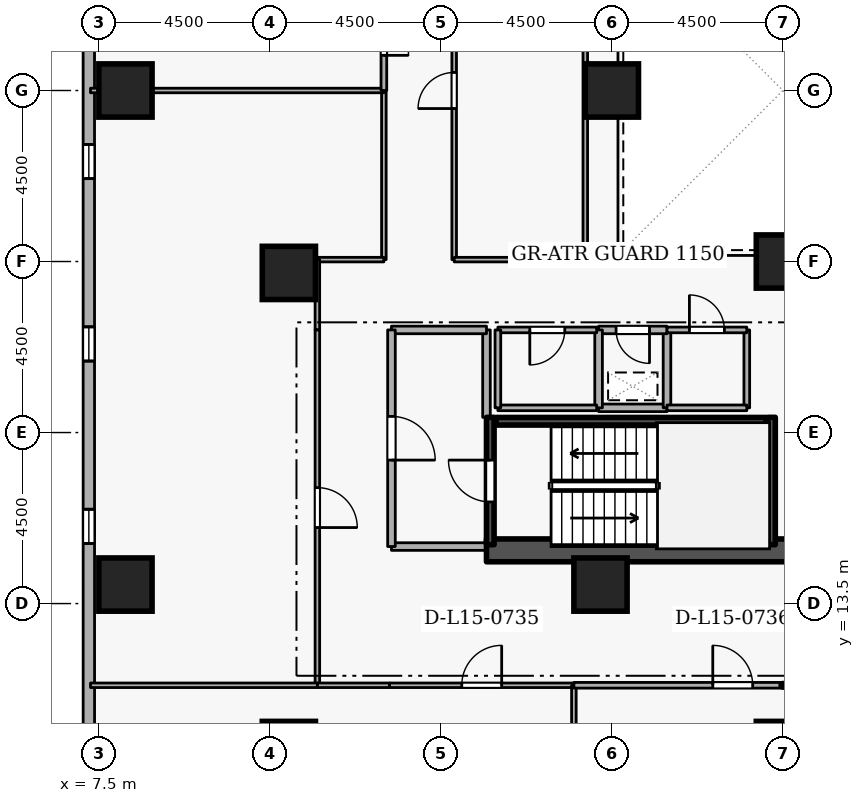
"""IFC4 building model, lengths in metres.
Left out: names, types, materials, properties, quantities, classifications, styles, units other than length and angle.
Written with IfcOpenShell. Run it as: python <this file> out.ifc"""

import sys

from ifc_helpers import new_model, si_unit, direction, frame, frame_2d, origin, origin_2d, place, context, subcontext, project, spatial, rectangle, extrude, element, fill, save


model = new_model("IFC4")
c1 = context("Model", 3, precision=1e-05, world=origin(), true_north=direction((0.0, 1.0)))
c2 = subcontext(c1, "Body", "Model", "MODEL_VIEW")
j1 = project(units=[si_unit("LENGTHUNIT", "METRE"), si_unit("PLANEANGLEUNIT", "RADIAN")], contexts=[c1])
p1 = place(None, origin())
s1 = spatial("IfcSite", under=j1, at=p1, CompositionType="ELEMENT")
p2 = place(p1, origin())
s2 = spatial("IfcBuilding", under=s1, at=p2, CompositionType="ELEMENT")
p3 = place(p2, frame((0.0, 0.0, 60.9)))
s3 = spatial("IfcBuildingStorey", under=s2, at=p3, CompositionType="ELEMENT", Elevation=60.9)
p4 = place(p3, frame((17.7, 14.9, 0.0), z_axis=(0.0, 0.0, 1.0), x_axis=(1.0, 0.0, 0.0)))
e1 = element("IfcWall", 1, at=p4, inside=s3, PredefinedType="SHEAR", context=c2, shape_type="SweptSolid", body=[
    extrude(rectangle(XDim=15.6, YDim=0.6, at=frame_2d((7.8, 0.0))), origin(), (0.0, 0.0, 1.0), 3.6),
])
for number, where, z_axis, x_axis in (
    (2, (12.5, 9.7, 0.0), (0.0, 0.0, 1.0), (1.0, 0.0, 0.0)),
    (3, (25.5, 9.7, 0.0), (0.0, 0.0, 1.0), (1.0, 0.0, 0.0)),
    (4, (8.2, 14.0, 0.0), (0.0, 0.0, 1.0), (1.0, 0.0, 0.0)),
    (5, (8.2, 27.0, 0.0), (0.0, 0.0, 1.0), (1.0, 0.0, 0.0)),
    (6, (12.5, 22.2, 0.0), (0.0, 0.0, 1.0), (1.0, 0.0, 0.0)),
    (7, (20.7, 14.0, 0.0), (0.0, 0.0, 1.0), (1.0, 0.0, 0.0)),
    (8, (25.5, 22.5, 0.0), (0.0, 0.0, 1.0), (1.0, 0.0, 0.0)),
    (9, (21.0, 27.0, 0.0), (0.0, 0.0, 1.0), (1.0, 0.0, 0.0)),
):
    element("IfcColumn", number, at=place(p3, frame(where, z_axis=z_axis, x_axis=x_axis)), inside=s3, PredefinedType="COLUMN", context=c2, shape_type="SweptSolid", body=[
        extrude(rectangle(XDim=1.4, YDim=1.4, at=origin_2d()), origin(), (0.0, 0.0, 1.0), 3.6),
    ])
p5 = place(p3, frame((7.235, 42.681, 0.0), z_axis=(0.0, 0.0, 1.0), x_axis=(5.985515e-05, -0.999999998209, 0.0)))
e10 = element("IfcWall", 10, at=p5, inside=s3, PredefinedType="STANDARD", context=c2, shape_type="SweptSolid", body=[
    extrude(rectangle(XDim=36.71, YDim=0.3, at=frame_2d((18.355, 0.0))), origin(), (0.0, 0.0, 1.0), 2.7),
])
p6 = place(p5, frame((7.5, 0.0, 0.72)))
e11 = element("IfcOpeningElement", 11, at=p6, cuts=e10, PredefinedType="OPENING", context=c2, shape_type="SweptSolid", body=[
    extrude(rectangle(XDim=0.9, YDim=1.75, at=frame_2d((0.45, 0.875))), frame((0.0, 0.16, 0.0), z_axis=(0.0, -1.0, 0.0), x_axis=(1.0, 0.0, 0.0)), (0.0, 0.0, 1.0), 0.32),
])
p7 = place(p5, frame((17.1, 0.0, 0.72)))
e12 = element("IfcOpeningElement", 12, at=p7, cuts=e10, PredefinedType="OPENING", context=c2, shape_type="SweptSolid", body=[
    extrude(rectangle(XDim=0.9, YDim=1.75, at=frame_2d((0.45, 0.875))), frame((0.0, 0.16, 0.0), z_axis=(0.0, -1.0, 0.0), x_axis=(1.0, 0.0, 0.0)), (0.0, 0.0, 1.0), 0.32),
])
p8 = place(p5, frame((21.9, 0.0, 0.72)))
e13 = element("IfcOpeningElement", 13, at=p8, cuts=e10, PredefinedType="OPENING", context=c2, shape_type="SweptSolid", body=[
    extrude(rectangle(XDim=0.9, YDim=1.75, at=frame_2d((0.45, 0.875))), frame((0.0, 0.16, 0.0), z_axis=(0.0, -1.0, 0.0), x_axis=(1.0, 0.0, 0.0)), (0.0, 0.0, 1.0), 0.32),
])
p9 = place(p5, frame((26.7, 0.0, 0.72)))
e14 = element("IfcOpeningElement", 14, at=p9, cuts=e10, PredefinedType="OPENING", context=c2, shape_type="SweptSolid", body=[
    extrude(rectangle(XDim=0.9, YDim=1.75, at=frame_2d((0.45, 0.875))), frame((0.0, 0.16, 0.0), z_axis=(0.0, -1.0, 0.0), x_axis=(1.0, 0.0, 0.0)), (0.0, 0.0, 1.0), 0.32),
])
p10 = place(p3, frame((17.8, 15.05, 0.0), z_axis=(0.0, 0.0, 1.0), x_axis=(0.0, 1.0, 0.0)))
e15 = element("IfcWall", 15, at=p10, inside=s3, PredefinedType="SHEAR", context=c2, shape_type="SweptSolid", body=[
    extrude(rectangle(XDim=3.35, YDim=0.2, at=frame_2d((1.675, 0.0))), origin(), (0.0, 0.0, 1.0), 3.6),
])
p11 = place(p10, frame((1.125, 0.0, 0.0)))
e16 = element("IfcOpeningElement", 16, at=p11, cuts=e15, PredefinedType="OPENING", context=c2, shape_type="SweptSolid", body=[
    extrude(rectangle(XDim=1.1, YDim=2.1, at=frame_2d((0.55, 1.05))), frame((0.0, 0.11, 0.0), z_axis=(0.0, -1.0, 0.0), x_axis=(1.0, 0.0, 0.0)), (0.0, 0.0, 1.0), 0.22),
])
p12 = place(p3, frame((25.2, 18.4, 0.0), z_axis=(0.0, 0.0, 1.0), x_axis=(0.0, -1.0, 0.0)))
e17 = element("IfcWall", 17, at=p12, inside=s3, PredefinedType="SHEAR", context=c2, shape_type="SweptSolid", body=[
    extrude(rectangle(XDim=3.35, YDim=0.2, at=frame_2d((1.675, 0.0))), origin(), (0.0, 0.0, 1.0), 3.6),
])
p13 = place(p3, frame((25.05, 18.297, 0.0), z_axis=(0.0, 0.0, 1.0), x_axis=(-1.0, 0.0, 0.0)))
e18 = element("IfcWall", 18, at=p13, inside=s3, PredefinedType="SHEAR", context=c2, shape_type="SweptSolid", body=[
    extrude(rectangle(XDim=7.1, YDim=0.2, at=frame_2d((3.55, 0.0))), origin(), (0.0, 0.0, 1.0), 3.6),
])
p14 = place(p3, frame((15.2, 15.0, 0.0), z_axis=(0.0, 0.0, 1.0), x_axis=(1.0, 0.0, 0.0)))
e19 = element("IfcWall", 19, at=p14, inside=s3, PredefinedType="STANDARD", context=c2, shape_type="SweptSolid", body=[
    extrude(rectangle(XDim=2.5, YDim=0.2, at=frame_2d((1.25, 0.0))), origin(), (0.0, 0.0, 1.0), 3.34),
])
p15 = place(p3, frame((17.7, 18.4, 0.0), z_axis=(0.0, 0.0, 1.0), x_axis=(0.0, 1.0, 0.0)))
e20 = element("IfcWall", 20, at=p15, inside=s3, PredefinedType="STANDARD", context=c2, shape_type="SweptSolid", body=[
    extrude(rectangle(XDim=2.3, YDim=0.2, at=frame_2d((1.15, 0.0))), origin(), (0.0, 0.0, 1.0), 2.545),
])
p16 = place(p3, frame((17.7, 20.7, 0.0), z_axis=(0.0, 0.0, 1.0), x_axis=(-1.0, 0.0, 0.0)))
e21 = element("IfcWall", 21, at=p16, inside=s3, PredefinedType="STANDARD", context=c2, shape_type="SweptSolid", body=[
    extrude(rectangle(XDim=2.5, YDim=0.2, at=frame_2d((1.25, 0.0))), origin(), (0.0, 0.0, 1.0), 3.34),
])
p17 = place(p3, frame((15.2, 20.7, 0.0), z_axis=(0.0, 0.0, 1.0), x_axis=(0.0, -1.0, 0.0)))
e22 = element("IfcWall", 22, at=p17, inside=s3, PredefinedType="STANDARD", context=c2, shape_type="SweptSolid", body=[
    extrude(rectangle(XDim=5.7, YDim=0.2, at=frame_2d((2.85, 0.0))), origin(), (0.0, 0.0, 1.0), 3.34),
])
p18 = place(p17, frame((2.275, 0.0, 0.0)))
e23 = element("IfcOpeningElement", 23, at=p18, cuts=e22, PredefinedType="OPENING", context=c2, shape_type="SweptSolid", body=[
    extrude(rectangle(XDim=1.15, YDim=2.1, at=frame_2d((0.575, 1.05))), frame((0.0, 0.11, 0.0), z_axis=(0.0, -1.0, 0.0), x_axis=(1.0, 0.0, 0.0)), (0.0, 0.0, 1.0), 0.22),
])
p19 = place(p3, frame((20.65, 18.65, 0.0), z_axis=(0.0, 0.0, 1.0), x_axis=(1.0, 0.0, 0.0)))
e24 = element("IfcWall", 24, at=p19, inside=s3, PredefinedType="STANDARD", context=c2, shape_type="SweptSolid", body=[
    extrude(rectangle(XDim=1.8, YDim=0.2, at=frame_2d((0.9, 0.0))), origin(), (0.0, 0.0, 1.0), 3.34),
])
p20 = place(p3, frame((22.45, 18.65, 0.0), z_axis=(0.0, 0.0, 1.0), x_axis=(0.0, 1.0, 0.0)))
e25 = element("IfcWall", 25, at=p20, inside=s3, PredefinedType="STANDARD", context=c2, shape_type="SweptSolid", body=[
    extrude(rectangle(XDim=2.05, YDim=0.2, at=frame_2d((1.025, 0.0))), origin(), (0.0, 0.0, 1.0), 3.34),
])
p21 = place(p3, frame((22.45, 20.7, 0.0), z_axis=(0.0, 0.0, 1.0), x_axis=(-1.0, 0.0, 0.0)))
e26 = element("IfcWall", 26, at=p21, inside=s3, PredefinedType="STANDARD", context=c2, shape_type="SweptSolid", body=[
    extrude(rectangle(XDim=1.8, YDim=0.2, at=frame_2d((0.9, 0.0))), origin(), (0.0, 0.0, 1.0), 3.34),
])
p22 = place(p21, frame((0.46, 0.0, 0.0)))
e27 = element("IfcOpeningElement", 27, at=p22, cuts=e26, PredefinedType="OPENING", context=c2, shape_type="SweptSolid", body=[
    extrude(rectangle(XDim=0.88, YDim=2.04, at=frame_2d((0.44, 1.02))), frame((0.0, 0.11, 0.0), z_axis=(0.0, -1.0, 0.0), x_axis=(1.0, 0.0, 0.0)), (0.0, 0.0, 1.0), 0.22),
])
p23 = place(p3, frame((20.65, 20.7, 0.0), z_axis=(0.0, 0.0, 1.0), x_axis=(0.0, -1.0, 0.0)))
e28 = element("IfcWall", 28, at=p23, inside=s3, PredefinedType="STANDARD", context=c2, shape_type="SweptSolid", body=[
    extrude(rectangle(XDim=2.05, YDim=0.2, at=frame_2d((1.025, 0.0))), origin(), (0.0, 0.0, 1.0), 3.34),
])
p24 = place(p3, frame((18.0, 18.65, 0.0), z_axis=(0.0, 0.0, 1.0), x_axis=(1.0, 0.0, 0.0)))
e29 = element("IfcWall", 29, at=p24, inside=s3, PredefinedType="PARTITIONING", context=c2, shape_type="SweptSolid", body=[
    extrude(rectangle(XDim=2.6, YDim=0.15, at=frame_2d((1.3, 0.0))), origin(), (0.0, 0.0, 1.0), 3.34),
])
p25 = place(p3, frame((20.6, 20.7, 0.0), z_axis=(0.0, 0.0, 1.0), x_axis=(-1.0, 0.0, 0.0)))
e30 = element("IfcWall", 30, at=p25, inside=s3, PredefinedType="PARTITIONING", context=c2, shape_type="SweptSolid", body=[
    extrude(rectangle(XDim=2.6, YDim=0.15, at=frame_2d((1.3, 0.0))), origin(), (0.0, 0.0, 1.0), 3.34),
])
p26 = place(p25, frame((0.84, 0.0, 0.0)))
e31 = element("IfcOpeningElement", 31, at=p26, cuts=e30, PredefinedType="OPENING", context=c2, shape_type="SweptSolid", body=[
    extrude(rectangle(XDim=0.92, YDim=2.08, at=frame_2d((0.46, 1.04))), frame((0.0, 0.085, 0.0), z_axis=(0.0, -1.0, 0.0), x_axis=(1.0, 0.0, 0.0)), (0.0, 0.0, 1.0), 0.17),
])
p27 = place(p3, frame((18.0, 20.7, 0.0), z_axis=(0.0, 0.0, 1.0), x_axis=(0.0, -1.0, 0.0)))
e32 = element("IfcWall", 32, at=p27, inside=s3, PredefinedType="PARTITIONING", context=c2, shape_type="SweptSolid", body=[
    extrude(rectangle(XDim=2.05, YDim=0.15, at=frame_2d((1.025, 0.0))), origin(), (0.0, 0.0, 1.0), 2.545),
])
p28 = place(p3, frame((24.55, 20.7, 0.0), z_axis=(0.0, 0.0, 1.0), x_axis=(0.0, -1.0, 0.0)))
e33 = element("IfcWall", 33, at=p28, inside=s3, PredefinedType="PARTITIONING", context=c2, shape_type="SweptSolid", body=[
    extrude(rectangle(XDim=2.05, YDim=0.15, at=frame_2d((1.025, 0.0))), origin(), (0.0, 0.0, 1.0), 3.34),
])
p29 = place(p3, frame((24.55, 18.65, 0.0), z_axis=(0.0, 0.0, 1.0), x_axis=(-1.0, 0.0, 0.0)))
e34 = element("IfcWall", 34, at=p29, inside=s3, PredefinedType="PARTITIONING", context=c2, shape_type="SweptSolid", body=[
    extrude(rectangle(XDim=2.1, YDim=0.15, at=frame_2d((1.05, 0.0))), origin(), (0.0, 0.0, 1.0), 3.34),
])
p30 = place(p3, frame((22.45, 20.7, 0.0), z_axis=(0.0, 0.0, 1.0), x_axis=(1.0, 0.0, 0.0)))
e35 = element("IfcWall", 35, at=p30, inside=s3, PredefinedType="PARTITIONING", context=c2, shape_type="SweptSolid", body=[
    extrude(rectangle(XDim=2.1, YDim=0.15, at=frame_2d((1.05, 0.0))), origin(), (0.0, 0.0, 1.0), 3.34),
])
p31 = place(p30, frame((0.59, 0.0, 0.0)))
e36 = element("IfcOpeningElement", 36, at=p31, cuts=e35, PredefinedType="OPENING", context=c2, shape_type="SweptSolid", body=[
    extrude(rectangle(XDim=0.92, YDim=2.08, at=frame_2d((0.46, 1.04))), frame((0.0, 0.085, 0.0), z_axis=(0.0, -1.0, 0.0), x_axis=(1.0, 0.0, 0.0)), (0.0, 0.0, 1.0), 0.17),
])
p32 = place(p3, frame((15.0, 27.0, 0.0), z_axis=(0.0, 0.0, 1.0), x_axis=(0.0, -1.0, 0.0)))
e37 = element("IfcWall", 37, at=p32, inside=s3, PredefinedType="PARTITIONING", context=c2, shape_type="SweptSolid", body=[
    extrude(rectangle(XDim=4.45, YDim=0.12, at=frame_2d((2.225, 0.0))), origin(), (0.0, 0.0, 1.0), 3.34),
])
p33 = place(p3, frame((15.0, 22.55, 0.0), z_axis=(0.0, 0.0, 1.0), x_axis=(-1.0, 0.0, 0.0)))
e38 = element("IfcWall", 38, at=p33, inside=s3, PredefinedType="PARTITIONING", context=c2, shape_type="SweptSolid", body=[
    extrude(rectangle(XDim=1.75, YDim=0.12, at=frame_2d((0.875, 0.0))), origin(), (0.0, 0.0, 1.0), 3.34),
])
p34 = place(p3, frame((13.25, 22.55, 0.0), z_axis=(0.0, 0.0, 1.0), x_axis=(0.0, -1.0, 0.0)))
e39 = element("IfcWall", 39, at=p34, inside=s3, PredefinedType="PARTITIONING", context=c2, shape_type="SweptSolid", body=[
    extrude(rectangle(XDim=1.85, YDim=0.12, at=frame_2d((0.925, 0.0))), origin(), (0.0, 0.0, 1.0), 3.34),
])
p35 = place(p3, frame((13.25, 20.7, 0.0), z_axis=(0.0, 0.0, 1.0), x_axis=(0.0, -1.0, 0.0)))
e40 = element("IfcWall", 40, at=p35, inside=s3, PredefinedType="PARTITIONING", context=c2, shape_type="SweptSolid", body=[
    extrude(rectangle(XDim=9.35, YDim=0.12, at=frame_2d((4.675, 0.0))), origin(), (0.0, 0.0, 1.0), 3.34),
])
p36 = place(p35, frame((4.15, 0.0, 0.0)))
e41 = element("IfcOpeningElement", 41, at=p36, cuts=e40, PredefinedType="OPENING", context=c2, shape_type="SweptSolid", body=[
    extrude(rectangle(XDim=1.05, YDim=2.1, at=frame_2d((0.525, 1.05))), frame((0.0, 0.07, 0.0), z_axis=(0.0, -1.0, 0.0), x_axis=(1.0, 0.0, 0.0)), (0.0, 0.0, 1.0), 0.14),
])
p37 = place(p3, frame((13.25, 11.35, 0.0), z_axis=(0.0, 0.0, 1.0), x_axis=(-1.0, 0.0, 0.0)))
e42 = element("IfcWall", 42, at=p37, inside=s3, PredefinedType="PARTITIONING", context=c2, shape_type="SweptSolid", body=[
    extrude(rectangle(XDim=5.97, YDim=0.12, at=frame_2d((2.985, 0.0))), origin(), (0.0, 0.0, 1.0), 3.34),
])
p38 = place(p3, frame((7.28, 27.0, 0.0), z_axis=(0.0, 0.0, 1.0), x_axis=(1.0, 0.0, 0.0)))
e43 = element("IfcWall", 43, at=p38, inside=s3, PredefinedType="PARTITIONING", context=c2, shape_type="SweptSolid", body=[
    extrude(rectangle(XDim=7.72, YDim=0.12, at=frame_2d((3.86, 0.0))), origin(), (0.0, 0.0, 1.0), 2.878),
])
p39 = place(p3, frame((15.0, 30.15, 0.0), z_axis=(0.0, 0.0, 1.0), x_axis=(0.0, -1.0, 0.0)))
e44 = element("IfcWall", 44, at=p39, inside=s3, PredefinedType="PARTITIONING", context=c2, shape_type="SweptSolid", body=[
    extrude(rectangle(XDim=3.15, YDim=0.15, at=frame_2d((1.575, 0.0))), origin(), (0.0, 0.0, 1.0), 3.34),
])
p40 = place(p39, frame((0.925, 0.0, 0.0)))
e45 = element("IfcOpeningElement", 45, at=p40, cuts=e44, PredefinedType="OPENING", context=c2, shape_type="SweptSolid", body=[
    extrude(rectangle(XDim=1.3, YDim=2.12, at=frame_2d((0.65, 1.06))), frame((0.0, 0.085, 0.0), z_axis=(0.0, -1.0, 0.0), x_axis=(1.0, 0.0, 0.0)), (0.0, 0.0, 1.0), 0.17),
])
p41 = place(p3, frame((16.85, 22.55, 0.0), z_axis=(0.0, 0.0, 1.0), x_axis=(0.0, 1.0, 0.0)))
e46 = element("IfcWall", 46, at=p41, inside=s3, PredefinedType="PARTITIONING", context=c2, shape_type="SweptSolid", body=[
    extrude(rectangle(XDim=8.9, YDim=0.12, at=frame_2d((4.45, 0.0))), origin(), (0.0, 0.0, 1.0), 3.34),
])
p42 = place(p41, frame((3.975, 0.0, 0.0)))
e47 = element("IfcOpeningElement", 47, at=p42, cuts=e46, PredefinedType="OPENING", context=c2, shape_type="SweptSolid", body=[
    extrude(rectangle(XDim=0.95, YDim=2.1, at=frame_2d((0.475, 1.05))), frame((0.0, 0.07, 0.0), z_axis=(0.0, -1.0, 0.0), x_axis=(1.0, 0.0, 0.0)), (0.0, 0.0, 1.0), 0.14),
])
p43 = place(p3, frame((20.3, 31.45, 0.0), z_axis=(0.0, 0.0, 1.0), x_axis=(0.0, -1.0, 0.0)))
e48 = element("IfcWall", 48, at=p43, inside=s3, PredefinedType="PARTITIONING", context=c2, shape_type="SweptSolid", body=[
    extrude(rectangle(XDim=8.9, YDim=0.12, at=frame_2d((4.45, 0.0))), origin(), (0.0, 0.0, 1.0), 3.34),
])
p44 = place(p3, frame((20.3, 22.55, 0.0), z_axis=(0.0, 0.0, 1.0), x_axis=(-1.0, 0.0, 0.0)))
e49 = element("IfcWall", 49, at=p44, inside=s3, PredefinedType="PARTITIONING", context=c2, shape_type="SweptSolid", body=[
    extrude(rectangle(XDim=3.45, YDim=0.12, at=frame_2d((1.725, 0.0))), origin(), (0.0, 0.0, 1.0), 3.34),
])
p45 = place(p3, frame((13.25, 11.35, 0.0), z_axis=(0.0, 0.0, 1.0), x_axis=(1.0, 0.0, 0.0)))
e50 = element("IfcWall", 50, at=p45, inside=s3, PredefinedType="PARTITIONING", context=c2, shape_type="SweptSolid", body=[
    extrude(rectangle(XDim=1.9, YDim=0.12, at=frame_2d((0.95, 0.0))), origin(), (0.0, 0.0, 1.0), 3.34),
])
p46 = place(p3, frame((15.15, 11.35, 0.0), z_axis=(0.0, 0.0, 1.0), x_axis=(1.0, 0.0, 0.0)))
e51 = element("IfcWall", 51, at=p46, inside=s3, PredefinedType="PARTITIONING", context=c2, shape_type="SweptSolid", body=[
    extrude(rectangle(XDim=4.85, YDim=0.12, at=frame_2d((2.425, 0.0))), origin(), (0.0, 0.0, 1.0), 3.34),
])
p47 = place(p46, frame((1.9, 0.0, 0.0)))
e52 = element("IfcOpeningElement", 52, at=p47, cuts=e51, PredefinedType="OPENING", context=c2, shape_type="SweptSolid", body=[
    extrude(rectangle(XDim=1.05, YDim=2.1, at=frame_2d((0.525, 1.05))), frame((0.0, 0.07, 0.0), z_axis=(0.0, -1.0, 0.0), x_axis=(1.0, 0.0, 0.0)), (0.0, 0.0, 1.0), 0.14),
])
p48 = place(p3, frame((20.0, 11.35, 0.0), z_axis=(0.0, 0.0, 1.0), x_axis=(0.0, -1.0, 0.0)))
e53 = element("IfcWall", 53, at=p48, inside=s3, PredefinedType="PARTITIONING", context=c2, shape_type="SweptSolid", body=[
    extrude(rectangle(XDim=8.57, YDim=0.12, at=frame_2d((4.285, 0.0))), origin(), (0.0, 0.0, 1.0), 3.34),
])
p49 = place(p3, frame((20.0, 11.35, 0.0), z_axis=(0.0, 0.0, 1.0), x_axis=(1.0, 0.0, 0.0)))
e54 = element("IfcWall", 54, at=p49, inside=s3, PredefinedType="PARTITIONING", context=c2, shape_type="SweptSolid", body=[
    extrude(rectangle(XDim=11.0, YDim=0.15, at=frame_2d((5.5, 0.0))), origin(), (0.0, 0.0, 1.0), 3.34),
])
p50 = place(p49, frame((3.655, 0.0, 0.0)))
e55 = element("IfcOpeningElement", 55, at=p50, cuts=e54, PredefinedType="OPENING", context=c2, shape_type="SweptSolid", body=[
    extrude(rectangle(XDim=1.05, YDim=2.1, at=frame_2d((0.525, 1.05))), frame((0.0, 0.085, 0.0), z_axis=(0.0, -1.0, 0.0), x_axis=(1.0, 0.0, 0.0)), (0.0, 0.0, 1.0), 0.17),
])
p51 = place(p7, origin())
e56 = element("IfcWindow", 56, at=p51, inside=s3, PartitioningType="SINGLE_PANEL", PredefinedType="WINDOW", context=c2, shape_type="SweptSolid", body=[
    extrude(rectangle(XDim=0.9, YDim=1.75, at=frame_2d((0.45, 0.875))), frame((0.0, 0.03, 0.0), z_axis=(0.0, -1.0, 0.0), x_axis=(1.0, 0.0, 0.0)), (0.0, 0.0, 1.0), 0.06),
])
fill(e12, e56)
p52 = place(p8, origin())
e57 = element("IfcWindow", 57, at=p52, inside=s3, PartitioningType="SINGLE_PANEL", PredefinedType="WINDOW", context=c2, shape_type="SweptSolid", body=[
    extrude(rectangle(XDim=0.9, YDim=1.75, at=frame_2d((0.45, 0.875))), frame((0.0, 0.03, 0.0), z_axis=(0.0, -1.0, 0.0), x_axis=(1.0, 0.0, 0.0)), (0.0, 0.0, 1.0), 0.06),
])
fill(e13, e57)
p53 = place(p9, origin())
e58 = element("IfcWindow", 58, at=p53, inside=s3, PartitioningType="SINGLE_PANEL", PredefinedType="WINDOW", context=c2, shape_type="SweptSolid", body=[
    extrude(rectangle(XDim=0.9, YDim=1.75, at=frame_2d((0.45, 0.875))), frame((0.0, 0.03, 0.0), z_axis=(0.0, -1.0, 0.0), x_axis=(1.0, 0.0, 0.0)), (0.0, 0.0, 1.0), 0.06),
])
fill(e14, e58)
p54 = place(p11, origin())
e59 = element("IfcDoor", 59, at=p54, inside=s3, OperationType="SINGLE_SWING_RIGHT", PredefinedType="DOOR", context=c2, shape_type="SweptSolid", body=[
    extrude(rectangle(XDim=1.1, YDim=2.1, at=frame_2d((0.55, 1.05))), frame((0.0, 0.025, 0.0), z_axis=(0.0, -1.0, 0.0), x_axis=(1.0, 0.0, 0.0)), (0.0, 0.0, 1.0), 0.05),
])
fill(e16, e59)
p55 = place(p18, origin())
e60 = element("IfcDoor", 60, at=p55, inside=s3, OperationType="SINGLE_SWING_RIGHT", PredefinedType="DOOR", context=c2, shape_type="SweptSolid", body=[
    extrude(rectangle(XDim=1.15, YDim=2.1, at=frame_2d((0.575, 1.05))), frame((0.0, 0.025, 0.0), z_axis=(0.0, -1.0, 0.0), x_axis=(1.0, 0.0, 0.0)), (0.0, 0.0, 1.0), 0.05),
])
fill(e23, e60)
p56 = place(p22, origin())
e61 = element("IfcDoor", 61, at=p56, inside=s3, OperationType="SINGLE_SWING_LEFT", PredefinedType="DOOR", context=c2, shape_type="SweptSolid", body=[
    extrude(rectangle(XDim=0.88, YDim=2.04, at=frame_2d((0.44, 1.02))), frame((0.0, 0.025, 0.0), z_axis=(0.0, -1.0, 0.0), x_axis=(1.0, 0.0, 0.0)), (0.0, 0.0, 1.0), 0.05),
])
fill(e27, e61)
p57 = place(p26, origin())
e62 = element("IfcDoor", 62, at=p57, inside=s3, OperationType="SINGLE_SWING_RIGHT", PredefinedType="DOOR", context=c2, shape_type="SweptSolid", body=[
    extrude(rectangle(XDim=0.92, YDim=2.08, at=frame_2d((0.46, 1.04))), frame((0.0, 0.025, 0.0), z_axis=(0.0, -1.0, 0.0), x_axis=(1.0, 0.0, 0.0)), (0.0, 0.0, 1.0), 0.05),
])
fill(e31, e62)
p58 = place(p31, origin())
e63 = element("IfcDoor", 63, at=p58, inside=s3, OperationType="SINGLE_SWING_LEFT", PredefinedType="DOOR", context=c2, shape_type="SweptSolid", body=[
    extrude(rectangle(XDim=0.92, YDim=2.08, at=frame_2d((0.46, 1.04))), frame((0.0, 0.025, 0.0), z_axis=(0.0, -1.0, 0.0), x_axis=(1.0, 0.0, 0.0)), (0.0, 0.0, 1.0), 0.05),
])
fill(e36, e63)
p59 = place(p36, origin())
e64 = element("IfcDoor", 64, at=p59, inside=s3, OperationType="SINGLE_SWING_RIGHT", PredefinedType="DOOR", context=c2, shape_type="SweptSolid", body=[
    extrude(rectangle(XDim=1.05, YDim=2.1, at=frame_2d((0.525, 1.05))), frame((0.0, 0.025, 0.0), z_axis=(0.0, -1.0, 0.0), x_axis=(1.0, 0.0, 0.0)), (0.0, 0.0, 1.0), 0.05),
])
fill(e41, e64)
p60 = place(p40, origin())
e65 = element("IfcDoor", 65, at=p60, inside=s3, OperationType="DOUBLE_DOOR_SINGLE_SWING", PredefinedType="DOOR", context=c2, shape_type="SweptSolid", body=[
    extrude(rectangle(XDim=1.3, YDim=2.12, at=frame_2d((0.65, 1.06))), frame((0.0, 0.025, 0.0), z_axis=(0.0, -1.0, 0.0), x_axis=(1.0, 0.0, 0.0)), (0.0, 0.0, 1.0), 0.05),
])
fill(e45, e65)
p61 = place(p42, origin())
e66 = element("IfcDoor", 66, at=p61, inside=s3, OperationType="SINGLE_SWING_LEFT", PredefinedType="DOOR", context=c2, shape_type="SweptSolid", body=[
    extrude(rectangle(XDim=0.95, YDim=2.1, at=frame_2d((0.475, 1.05))), frame((0.0, 0.025, 0.0), z_axis=(0.0, -1.0, 0.0), x_axis=(1.0, 0.0, 0.0)), (0.0, 0.0, 1.0), 0.05),
])
fill(e47, e66)
p62 = place(p47, origin())
e67 = element("IfcDoor", 67, at=p62, inside=s3, OperationType="SINGLE_SWING_RIGHT", PredefinedType="DOOR", context=c2, shape_type="SweptSolid", body=[
    extrude(rectangle(XDim=1.05, YDim=2.1, at=frame_2d((0.525, 1.05))), frame((0.0, 0.025, 0.0), z_axis=(0.0, -1.0, 0.0), x_axis=(1.0, 0.0, 0.0)), (0.0, 0.0, 1.0), 0.05),
])
fill(e52, e67)
p63 = place(p50, origin())
e68 = element("IfcDoor", 68, at=p63, inside=s3, OperationType="SINGLE_SWING_LEFT", PredefinedType="DOOR", context=c2, shape_type="SweptSolid", body=[
    extrude(rectangle(XDim=1.05, YDim=2.1, at=frame_2d((0.525, 1.05))), frame((0.0, 0.025, 0.0), z_axis=(0.0, -1.0, 0.0), x_axis=(1.0, 0.0, 0.0)), (0.0, 0.0, 1.0), 0.05),
])
fill(e55, e68)
save(model, sys.argv[1])
